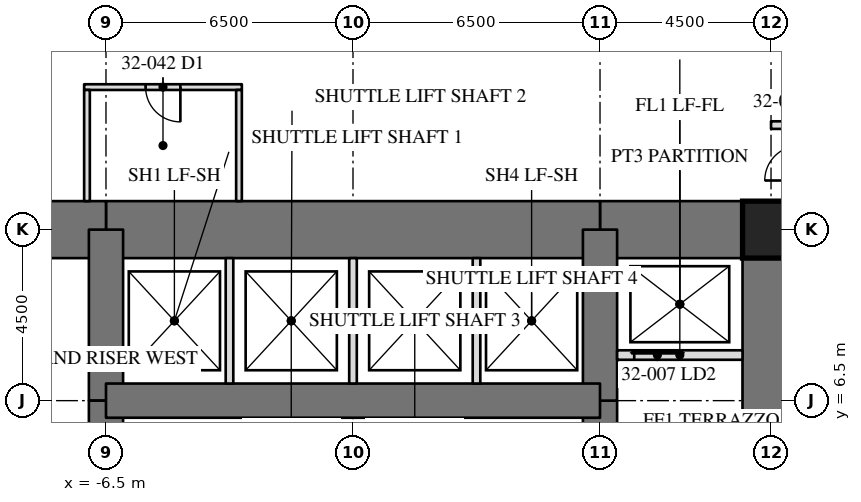
"""IFC4 building model, lengths in metres.
Left out: names, types, materials, properties, quantities, classifications, styles, units other than length and angle.
Written with IfcOpenShell. Run it as: python <this file> out.ifc"""

import sys

from ifc_helpers import new_model, si_unit, direction, frame, frame_2d, origin, origin_2d, place, context, subcontext, project, spatial, rectangle, hollow_rectangle, extrude, element, fill, save


model = new_model("IFC4")
c1 = context("Model", 3, precision=1e-05, world=origin(), true_north=direction((0.0, 1.0)))
c2 = subcontext(c1, "Body", "Model", "MODEL_VIEW")
j1 = project(units=[si_unit("LENGTHUNIT", "METRE"), si_unit("PLANEANGLEUNIT", "RADIAN")], contexts=[c1])
p1 = place(None, origin())
s1 = spatial("IfcSite", under=j1, at=p1, CompositionType="ELEMENT")
p2 = place(p1, origin())
s2 = spatial("IfcBuilding", under=s1, at=p2, CompositionType="ELEMENT")
p3 = place(p2, frame((0.0, 0.0, 137.7)))
s3 = spatial("IfcBuildingStorey", under=s2, at=p3, CompositionType="ELEMENT", Elevation=137.7)
p4 = place(p3, frame((11.0, -11.0, 0.0), z_axis=(0.0, 0.0, 1.0), x_axis=(0.0, 1.0, 0.0)))
e1 = element("IfcWall", 1, at=p4, inside=s3, PredefinedType="SHEAR", context=c2, shape_type="SweptSolid", body=[
    extrude(rectangle(XDim=22.0, YDim=1.5, at=frame_2d((11.0, 0.0))), origin(), (0.0, 0.0, 1.0), 4.1),
])
p5 = place(p4, frame((15.393, 0.0, 0.0)))
e2 = element("IfcOpeningElement", 2, at=p5, cuts=e1, PredefinedType="OPENING", context=c2, shape_type="SweptSolid", body=[
    extrude(rectangle(XDim=0.915, YDim=2.134, at=frame_2d((0.458, 1.067))), frame((0.0, 0.76, 0.0), z_axis=(0.0, -1.0, 0.0), x_axis=(1.0, 0.0, 0.0)), (0.0, 0.0, 1.0), 1.52),
])
p6 = place(p3, frame((11.0, 11.0, 0.0), z_axis=(0.0, 0.0, 1.0), x_axis=(-1.0, 0.0, 0.0)))
e3 = element("IfcWall", 3, at=p6, inside=s3, PredefinedType="SHEAR", context=c2, shape_type="SweptSolid", body=[
    extrude(rectangle(XDim=4.5, YDim=1.5, at=frame_2d((2.25, 0.0))), origin(), (0.0, 0.0, 1.0), 4.1),
])
p7 = place(p3, frame((6.5, 11.0, 0.0), z_axis=(0.0, 0.0, 1.0), x_axis=(-1.0, 0.0, 0.0)))
e4 = element("IfcWall", 4, at=p7, inside=s3, PredefinedType="SHEAR", context=c2, shape_type="SweptSolid", body=[
    extrude(rectangle(XDim=13.0, YDim=1.5, at=frame_2d((6.5, 0.0))), origin(), (0.0, 0.0, 1.0), 4.1),
])
p8 = place(p3, frame((-6.5, 11.0, 0.0), z_axis=(0.0, 0.0, 1.0), x_axis=(-1.0, 0.0, 0.0)))
e5 = element("IfcWall", 5, at=p8, inside=s3, PredefinedType="SHEAR", context=c2, shape_type="SweptSolid", body=[
    extrude(rectangle(XDim=4.5, YDim=1.5, at=frame_2d((2.25, 0.0))), origin(), (0.0, 0.0, 1.0), 4.1),
])
p9 = place(p3, frame((6.5, -6.5, 0.0), z_axis=(0.0, 0.0, 1.0), x_axis=(0.0, 1.0, 0.0)))
e6 = element("IfcWall", 6, at=p9, inside=s3, PredefinedType="SHEAR", context=c2, shape_type="SweptSolid", body=[
    extrude(rectangle(XDim=13.0, YDim=0.9, at=frame_2d((6.5, 0.0))), origin(), (0.0, 0.0, 1.0), 4.1),
])
p10 = place(p9, frame((10.893, 0.0, 0.0)))
e7 = element("IfcOpeningElement", 7, at=p10, cuts=e6, PredefinedType="OPENING", context=c2, shape_type="SweptSolid", body=[
    extrude(rectangle(XDim=0.915, YDim=2.134, at=frame_2d((0.458, 1.067))), frame((0.0, 0.46, 0.0), z_axis=(0.0, -1.0, 0.0), x_axis=(1.0, 0.0, 0.0)), (0.0, 0.0, 1.0), 0.92),
])
p11 = place(p9, frame((0.61, 0.0, 0.0)))
e8 = element("IfcOpeningElement", 8, at=p11, cuts=e6, PredefinedType="OPENING", context=c2, shape_type="SweptSolid", body=[
    extrude(rectangle(XDim=0.915, YDim=2.134, at=frame_2d((0.458, 1.067))), frame((0.0, 0.46, 0.0), z_axis=(0.0, -1.0, 0.0), x_axis=(1.0, 0.0, 0.0)), (0.0, 0.0, 1.0), 0.92),
])
for number, where, z_axis, x_axis in (
    (9, (6.5, 6.5, 0.0), (0.0, 0.0, 1.0), (0.0, 1.0, 0.0)),
    (10, (-6.5, 11.0, 0.0), (0.0, 0.0, 1.0), (0.0, -1.0, 0.0)),
):
    element("IfcWall", number, at=place(p3, frame(where, z_axis=z_axis, x_axis=x_axis)), inside=s3, PredefinedType="SHEAR", context=c2, shape_type="SweptSolid", body=[
        extrude(rectangle(XDim=4.5, YDim=0.9, at=frame_2d((2.25, 0.0))), origin(), (0.0, 0.0, 1.0), 4.1),
    ])
p12 = place(p3, frame((-6.5, 6.5, 0.0), z_axis=(0.0, 0.0, 1.0), x_axis=(0.0, -1.0, 0.0)))
e11 = element("IfcWall", 11, at=p12, inside=s3, PredefinedType="SHEAR", context=c2, shape_type="SweptSolid", body=[
    extrude(rectangle(XDim=13.0, YDim=0.9, at=frame_2d((6.5, 0.0))), origin(), (0.0, 0.0, 1.0), 4.1),
])
p13 = place(p12, frame((10.893, 0.0, 0.0)))
e12 = element("IfcOpeningElement", 12, at=p13, cuts=e11, PredefinedType="OPENING", context=c2, shape_type="SweptSolid", body=[
    extrude(rectangle(XDim=0.915, YDim=2.134, at=frame_2d((0.458, 1.067))), frame((0.0, 0.46, 0.0), z_axis=(0.0, -1.0, 0.0), x_axis=(1.0, 0.0, 0.0)), (0.0, 0.0, 1.0), 0.92),
])
p14 = place(p12, frame((0.61, 0.0, 0.0)))
e13 = element("IfcOpeningElement", 13, at=p14, cuts=e11, PredefinedType="OPENING", context=c2, shape_type="SweptSolid", body=[
    extrude(rectangle(XDim=0.915, YDim=2.134, at=frame_2d((0.458, 1.067))), frame((0.0, 0.46, 0.0), z_axis=(0.0, -1.0, 0.0), x_axis=(1.0, 0.0, 0.0)), (0.0, 0.0, 1.0), 0.92),
])
p15 = place(p3, frame((6.5, 6.5, 0.0), z_axis=(0.0, 0.0, 1.0), x_axis=(-1.0, 0.0, 0.0)))
e14 = element("IfcWall", 14, at=p15, inside=s3, PredefinedType="SHEAR", context=c2, shape_type="SweptSolid", body=[
    extrude(rectangle(XDim=13.0, YDim=0.9, at=frame_2d((6.5, 0.0))), origin(), (0.0, 0.0, 1.0), 4.1),
])
p16 = place(p3, frame((11.0, 11.0, 0.0), z_axis=(0.0, 0.0, 1.0), x_axis=(1.0, 0.0, 0.0)))
e15 = element("IfcColumn", 15, at=p16, inside=s3, PredefinedType="COLUMN", context=c2, shape_type="SweptSolid", body=[
    extrude(hollow_rectangle(XDim=1.499, YDim=1.499, WallThickness=0.102, at=origin_2d()), origin(), (0.0, 0.0, 1.0), 4.1),
])
p17 = place(p3, frame((6.95, 7.7, 0.0), z_axis=(0.0, 0.0, 1.0), x_axis=(1.0, 0.0, 0.0)))
e16 = element("IfcWall", 16, at=p17, inside=s3, PredefinedType="PARTITIONING", context=c2, shape_type="SweptSolid", body=[
    extrude(rectangle(XDim=3.3, YDim=0.25, at=frame_2d((1.65, 0.0))), origin(), (0.0, 0.0, 1.0), 3.91),
])
p18 = place(p17, frame((0.45, 0.0, 0.0)))
e17 = element("IfcOpeningElement", 17, at=p18, cuts=e16, PredefinedType="OPENING", context=c2, shape_type="SweptSolid", body=[
    extrude(rectangle(XDim=1.219, YDim=2.134, at=frame_2d((0.609, 1.067))), frame((0.0, 0.135, 0.0), z_axis=(0.0, -1.0, 0.0), x_axis=(1.0, 0.0, 0.0)), (0.0, 0.0, 1.0), 0.27),
])
for number, where, z_axis, x_axis in (
    (18, (-3.25, 6.95, 0.0), (0.0, 0.0, 1.0), (0.0, 1.0, 0.0)),
    (19, (0.0, 6.95, 0.0), (0.0, 0.0, 1.0), (0.0, 1.0, 0.0)),
    (20, (3.25, 6.95, 0.0), (0.0, 0.0, 1.0), (0.0, 1.0, 0.0)),
):
    element("IfcWall", number, at=place(p3, frame(where, z_axis=z_axis, x_axis=x_axis)), inside=s3, PredefinedType="PARTITIONING", context=c2, shape_type="SweptSolid", body=[
        extrude(rectangle(XDim=3.3, YDim=0.2, at=frame_2d((1.65, 0.0))), origin(), (0.0, 0.0, 1.0), 3.91),
    ])
p19 = place(p3, frame((11.0, 13.75, 0.0), z_axis=(0.0, 0.0, 1.0), x_axis=(1.0, 0.0, 0.0)))
e21 = element("IfcWall", 21, at=p19, inside=s3, PredefinedType="PARTITIONING", context=c2, shape_type="SweptSolid", body=[
    extrude(rectangle(XDim=2.85, YDim=0.2, at=frame_2d((1.425, 0.0))), origin(), (0.0, 0.0, 1.0), 3.91),
])
p20 = place(p3, frame((-2.925, 14.75, 0.0), z_axis=(0.0, 0.0, 1.0), x_axis=(-1.0, 0.0, 0.0)))
e22 = element("IfcWall", 22, at=p20, inside=s3, PredefinedType="PARTITIONING", context=c2, shape_type="SweptSolid", body=[
    extrude(rectangle(XDim=4.15, YDim=0.15, at=frame_2d((2.075, 0.0))), origin(), (0.0, 0.0, 1.0), 3.91),
])
p21 = place(p20, frame((1.617, 0.0, 0.0)))
e23 = element("IfcOpeningElement", 23, at=p21, cuts=e22, PredefinedType="OPENING", context=c2, shape_type="SweptSolid", body=[
    extrude(rectangle(XDim=0.915, YDim=2.134, at=frame_2d((0.458, 1.067))), frame((0.0, 0.085, 0.0), z_axis=(0.0, -1.0, 0.0), x_axis=(1.0, 0.0, 0.0)), (0.0, 0.0, 1.0), 0.17),
])
for number, where, z_axis, x_axis in (
    (24, (-3.0, 14.675, 0.0), (0.0, 0.0, 1.0), (0.0, -1.0, 0.0)),
    (25, (-7.0, 14.675, 0.0), (0.0, 0.0, 1.0), (0.0, -1.0, 0.0)),
):
    element("IfcWall", number, at=place(p3, frame(where, z_axis=z_axis, x_axis=x_axis)), inside=s3, PredefinedType="PARTITIONING", context=c2, shape_type="SweptSolid", body=[
        extrude(rectangle(XDim=2.925, YDim=0.15, at=frame_2d((1.462, 0.0))), origin(), (0.0, 0.0, 1.0), 3.91),
    ])
p22 = place(p18, origin())
e26 = element("IfcDoor", 26, at=p22, inside=s3, OperationType="SLIDING_TO_LEFT", PredefinedType="DOOR", context=c2, shape_type="SweptSolid", body=[
    extrude(rectangle(XDim=1.219, YDim=2.134, at=frame_2d((0.609, 1.067))), frame((0.0, 0.025, 0.0), z_axis=(0.0, -1.0, 0.0), x_axis=(1.0, 0.0, 0.0)), (0.0, 0.0, 1.0), 0.05),
])
fill(e17, e26)
p23 = place(p21, origin())
e27 = element("IfcDoor", 27, at=p23, inside=s3, OperationType="SINGLE_SWING_LEFT", PredefinedType="DOOR", context=c2, shape_type="SweptSolid", body=[
    extrude(rectangle(XDim=0.915, YDim=2.134, at=frame_2d((0.458, 1.067))), frame((0.0, 0.025, 0.0), z_axis=(0.0, -1.0, 0.0), x_axis=(1.0, 0.0, 0.0)), (0.0, 0.0, 1.0), 0.05),
])
fill(e23, e27)
save(model, sys.argv[1])
